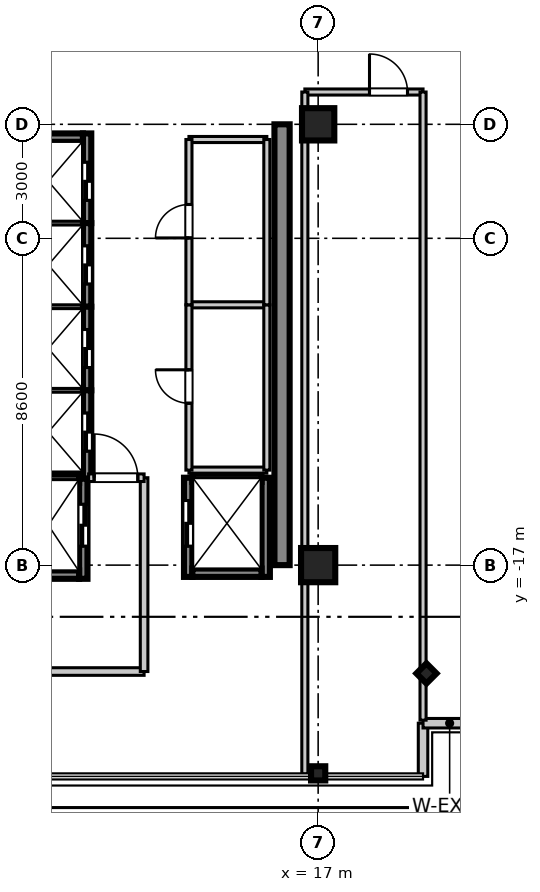
"""IFC4 building model, lengths in metres.
Left out: names, types, materials, properties, quantities, classifications, styles, units other than length and angle.
Written with IfcOpenShell. Run it as: python <this file> out.ifc"""

import sys

from ifc_helpers import new_model, si_unit, direction, frame, frame_2d, origin, origin_2d, place, context, subcontext, project, spatial, rectangle, i_section, extrude, source, transform, mapped, element, fill, save


model = new_model("IFC4")
c1 = context("Model", 3, precision=1e-05, world=origin(), true_north=direction((0.0, 1.0)))
c2 = subcontext(c1, "Body", "Model", "MODEL_VIEW")
j1 = project(units=[si_unit("LENGTHUNIT", "METRE"), si_unit("PLANEANGLEUNIT", "RADIAN")], contexts=[c1])
p1 = place(None, origin())
s1 = spatial("IfcSite", under=j1, at=p1, CompositionType="ELEMENT")
p2 = place(p1, origin())
s2 = spatial("IfcBuilding", under=s1, at=p2, CompositionType="ELEMENT")
p3 = place(p2, frame((0.0, 0.0, 266.3)))
s3 = spatial("IfcBuildingStorey", under=s2, at=p3, CompositionType="ELEMENT", Elevation=266.3)
m1 = source(origin(), c2, "Body", "SweptSolid", [
    extrude(rectangle(XDim=0.9, YDim=0.9, at=origin_2d()), origin(), (0.0, 0.0, 1.0), 3.705),
])
p4 = place(p3, frame((17.0, -17.0, 0.0), z_axis=(0.0, 0.0, 1.0), x_axis=(1.0, 0.0, 0.0)))
e1 = element("IfcColumn", 1, at=p4, inside=s3, PredefinedType="COLUMN", context=c2, shape_type="MappedRepresentation", body=[
    mapped(m1, transform((0.0, 0.0, 0.0), scale=1.0)),
])
m2 = source(origin(), c2, "Body", "SweptSolid", [
    extrude(rectangle(XDim=0.85, YDim=0.85, at=origin_2d()), origin(), (0.0, 0.0, 1.0), 3.705),
])
p5 = place(p3, frame((17.0, -5.4, 0.0), z_axis=(0.0, 0.0, 1.0), x_axis=(1.0, 0.0, 0.0)))
e2 = element("IfcColumn", 2, at=p5, inside=s3, PredefinedType="PILASTER", context=c2, shape_type="MappedRepresentation", body=[
    mapped(m2, transform((0.0, 0.0, 0.0), scale=1.0)),
])
m3 = source(origin(), c2, "Body", "SweptSolid", [
    extrude(i_section(OverallWidth=0.374, OverallDepth=0.374, WebThickness=0.014, FlangeThickness=0.023, at=origin_2d()), origin(), (0.0, 0.0, 1.0), 3.705),
])
for number, where, z_axis, x_axis in (
    (3, (17.0, -22.48, 0.0), (0.0, 0.0, 1.0), (0.0, 1.0, 0.0)),
    (4, (19.85, -19.85, 0.0), (0.0, 0.0, 1.0), (0.707, 0.707, 0.0)),
):
    element("IfcColumn", number, at=place(p3, frame(where, z_axis=z_axis, x_axis=x_axis)), inside=s3, PredefinedType="COLUMN", context=c2, shape_type="MappedRepresentation", body=[
        mapped(m3, transform((0.0, 0.0, 0.0), scale=1.0)),
    ])
m4 = source(origin(), c2, "Body", "SweptSolid", [
    extrude(rectangle(XDim=11.6, YDim=0.4, at=frame_2d((5.8, 0.0))), origin(), (0.0, 0.0, 1.0), 3.45),
])
p6 = place(p3, frame((16.05, -17.0, 0.0), z_axis=(0.0, 0.0, 1.0), x_axis=(0.0, 1.0, 0.0)))
e5 = element("IfcWall", 5, at=p6, inside=s3, PredefinedType="SHEAR", context=c2, shape_type="MappedRepresentation", body=[
    mapped(m4, transform((0.0, 0.0, 0.0), scale=1.0)),
])
m5 = source(origin(), c2, "Body", "SweptSolid", [
    extrude(rectangle(XDim=2.36, YDim=0.22, at=frame_2d((1.18, 0.0))), origin(), (0.0, 0.0, 1.0), 3.45),
])
p7 = place(p3, frame((10.92, -8.0, 0.0), z_axis=(0.0, 0.0, 1.0), x_axis=(0.0, 1.0, 0.0)))
e6 = element("IfcWall", 6, at=p7, inside=s3, PredefinedType="SHEAR", context=c2, shape_type="MappedRepresentation", body=[
    mapped(m5, transform((0.0, 0.0, 0.0), scale=1.0)),
])
p8 = place(p7, frame((0.6, 0.0, 0.0)))
e7 = element("IfcOpeningElement", 7, at=p8, cuts=e6, PredefinedType="OPENING", context=c2, shape_type="SweptSolid", body=[
    extrude(rectangle(XDim=1.0, YDim=2.2, at=frame_2d((0.5, 1.1))), frame((0.0, 0.12, 0.0), z_axis=(0.0, -1.0, 0.0), x_axis=(1.0, 0.0, 0.0)), (0.0, 0.0, 1.0), 0.24),
])
m6 = source(origin(), c2, "Body", "SweptSolid", [
    extrude(rectangle(XDim=1.82, YDim=0.22, at=frame_2d((0.91, 0.0))), origin(), (0.0, 0.0, 1.0), 3.45),
])
p9 = place(p3, frame((8.99, -5.75, 0.0), z_axis=(0.0, 0.0, 1.0), x_axis=(1.0, 0.0, 0.0)))
e8 = element("IfcWall", 8, at=p9, inside=s3, PredefinedType="SHEAR", context=c2, shape_type="MappedRepresentation", body=[
    mapped(m6, transform((0.0, 0.0, 0.0), scale=1.0)),
])
m7 = source(origin(), c2, "Body", "SweptSolid", [
    extrude(rectangle(XDim=2.2, YDim=0.22, at=frame_2d((1.1, 0.0))), origin(), (0.0, 0.0, 1.0), 3.45),
])
p10 = place(p3, frame((10.92, -10.2, 0.0), z_axis=(0.0, 0.0, 1.0), x_axis=(0.0, 1.0, 0.0)))
e9 = element("IfcWall", 9, at=p10, inside=s3, PredefinedType="SHEAR", context=c2, shape_type="MappedRepresentation", body=[
    mapped(m7, transform((0.0, 0.0, 0.0), scale=1.0)),
])
p11 = place(p10, frame((0.6, 0.0, 0.0)))
e10 = element("IfcOpeningElement", 10, at=p11, cuts=e9, PredefinedType="OPENING", context=c2, shape_type="SweptSolid", body=[
    extrude(rectangle(XDim=1.0, YDim=2.2, at=frame_2d((0.5, 1.1))), frame((0.0, 0.12, 0.0), z_axis=(0.0, -1.0, 0.0), x_axis=(1.0, 0.0, 0.0)), (0.0, 0.0, 1.0), 0.24),
])
m8 = source(origin(), c2, "Body", "SweptSolid", [
    extrude(rectangle(XDim=1.82, YDim=0.22, at=frame_2d((0.91, 0.0))), origin(), (0.0, 0.0, 1.0), 3.75),
])
p12 = place(p3, frame((8.99, -8.0, 0.0), z_axis=(0.0, 0.0, 1.0), x_axis=(1.0, 0.0, 0.0)))
e11 = element("IfcWall", 11, at=p12, inside=s3, PredefinedType="SHEAR", context=c2, shape_type="MappedRepresentation", body=[
    mapped(m8, transform((0.0, 0.0, 0.0), scale=1.0)),
])
p13 = place(p3, frame((10.92, -12.4, 0.0), z_axis=(0.0, 0.0, 1.0), x_axis=(0.0, 1.0, 0.0)))
e12 = element("IfcWall", 12, at=p13, inside=s3, PredefinedType="SHEAR", context=c2, shape_type="MappedRepresentation", body=[
    mapped(m7, transform((0.0, 0.0, 0.0), scale=1.0)),
])
p14 = place(p13, frame((0.6, 0.0, 0.0)))
e13 = element("IfcOpeningElement", 13, at=p14, cuts=e12, PredefinedType="OPENING", context=c2, shape_type="SweptSolid", body=[
    extrude(rectangle(XDim=1.0, YDim=2.2, at=frame_2d((0.5, 1.1))), frame((0.0, 0.12, 0.0), z_axis=(0.0, -1.0, 0.0), x_axis=(1.0, 0.0, 0.0)), (0.0, 0.0, 1.0), 0.24),
])
p15 = place(p3, frame((8.99, -10.2, 0.0), z_axis=(0.0, 0.0, 1.0), x_axis=(1.0, 0.0, 0.0)))
e14 = element("IfcWall", 14, at=p15, inside=s3, PredefinedType="SHEAR", context=c2, shape_type="MappedRepresentation", body=[
    mapped(m8, transform((0.0, 0.0, 0.0), scale=1.0)),
])
m9 = source(origin(), c2, "Body", "SweptSolid", [
    extrude(rectangle(XDim=2.325, YDim=0.22, at=frame_2d((1.163, 0.0))), origin(), (0.0, 0.0, 1.0), 3.45),
])
p16 = place(p3, frame((10.92, -14.725, 0.0), z_axis=(0.0, 0.0, 1.0), x_axis=(0.0, 1.0, 0.0)))
e15 = element("IfcWall", 15, at=p16, inside=s3, PredefinedType="SHEAR", context=c2, shape_type="MappedRepresentation", body=[
    mapped(m9, transform((0.0, 0.0, 0.0), scale=1.0)),
])
p17 = place(p16, frame((0.725, 0.0, 0.0)))
e16 = element("IfcOpeningElement", 16, at=p17, cuts=e15, PredefinedType="OPENING", context=c2, shape_type="SweptSolid", body=[
    extrude(rectangle(XDim=1.0, YDim=2.2, at=frame_2d((0.5, 1.1))), frame((0.0, 0.12, 0.0), z_axis=(0.0, -1.0, 0.0), x_axis=(1.0, 0.0, 0.0)), (0.0, 0.0, 1.0), 0.24),
])
p18 = place(p3, frame((8.99, -12.4, 0.0), z_axis=(0.0, 0.0, 1.0), x_axis=(1.0, 0.0, 0.0)))
e17 = element("IfcWall", 17, at=p18, inside=s3, PredefinedType="SHEAR", context=c2, shape_type="MappedRepresentation", body=[
    mapped(m8, transform((0.0, 0.0, 0.0), scale=1.0)),
])
m10 = source(origin(), c2, "Body", "SweptSolid", [
    extrude(rectangle(XDim=2.635, YDim=0.22, at=frame_2d((1.317, 0.0))), origin(), (0.0, 0.0, 1.0), 3.45),
])
p19 = place(p3, frame((10.82, -17.36, 0.0), z_axis=(0.0, 0.0, 1.0), x_axis=(0.0, 1.0, 0.0)))
e18 = element("IfcWall", 18, at=p19, inside=s3, PredefinedType="SHEAR", context=c2, shape_type="MappedRepresentation", body=[
    mapped(m10, transform((0.0, 0.0, 0.0), scale=1.0)),
])
p20 = place(p19, frame((0.86, 0.0, 0.0)))
e19 = element("IfcOpeningElement", 19, at=p20, cuts=e18, PredefinedType="OPENING", context=c2, shape_type="SweptSolid", body=[
    extrude(rectangle(XDim=1.1, YDim=2.2, at=frame_2d((0.55, 1.1))), frame((0.0, 0.12, 0.0), z_axis=(0.0, -1.0, 0.0), x_axis=(1.0, 0.0, 0.0)), (0.0, 0.0, 1.0), 0.24),
])
m11 = source(origin(), c2, "Body", "SweptSolid", [
    extrude(rectangle(XDim=1.62, YDim=0.22, at=frame_2d((0.81, 0.0))), origin(), (0.0, 0.0, 1.0), 3.45),
])
p21 = place(p3, frame((9.09, -17.25, 0.0), z_axis=(0.0, 0.0, 1.0), x_axis=(1.0, 0.0, 0.0)))
e20 = element("IfcWall", 20, at=p21, inside=s3, PredefinedType="SHEAR", context=c2, shape_type="MappedRepresentation", body=[
    mapped(m11, transform((0.0, 0.0, 0.0), scale=1.0)),
])
m12 = source(origin(), c2, "Body", "SweptSolid", [
    extrude(rectangle(XDim=1.62, YDim=0.22, at=frame_2d((0.81, 0.0))), origin(), (0.0, 0.0, 1.0), 3.75),
])
p22 = place(p3, frame((9.09, -14.725, 0.0), z_axis=(0.0, 0.0, 1.0), x_axis=(1.0, 0.0, 0.0)))
e21 = element("IfcWall", 21, at=p22, inside=s3, PredefinedType="SHEAR", context=c2, shape_type="MappedRepresentation", body=[
    mapped(m12, transform((0.0, 0.0, 0.0), scale=1.0)),
])
m13 = source(origin(), c2, "Body", "SweptSolid", [
    extrude(rectangle(XDim=2.61, YDim=0.22, at=frame_2d((1.305, 0.0))), origin(), (0.0, 0.0, 1.0), 3.45),
])
p23 = place(p3, frame((13.58, -17.31, 0.0), z_axis=(0.0, 0.0, 1.0), x_axis=(0.0, 1.0, 0.0)))
e22 = element("IfcWall", 22, at=p23, inside=s3, PredefinedType="SHEAR", context=c2, shape_type="MappedRepresentation", body=[
    mapped(m13, transform((0.0, 0.0, 0.0), scale=1.0)),
])
p24 = place(p23, frame((0.81, 0.0, 0.0)))
e23 = element("IfcOpeningElement", 23, at=p24, cuts=e22, PredefinedType="OPENING", context=c2, shape_type="SweptSolid", body=[
    extrude(rectangle(XDim=1.2, YDim=2.2, at=frame_2d((0.6, 1.1))), frame((0.0, 0.12, 0.0), z_axis=(0.0, -1.0, 0.0), x_axis=(1.0, 0.0, 0.0)), (0.0, 0.0, 1.0), 0.24),
])
p25 = place(p3, frame((15.62, -17.31, 0.0), z_axis=(0.0, 0.0, 1.0), x_axis=(0.0, 1.0, 0.0)))
e24 = element("IfcWall", 24, at=p25, inside=s3, PredefinedType="SHEAR", context=c2, shape_type="MappedRepresentation", body=[
    mapped(m13, transform((0.0, 0.0, 0.0), scale=1.0)),
])
p26 = place(p3, frame((13.69, -17.2, 0.0), z_axis=(0.0, 0.0, 1.0), x_axis=(1.0, 0.0, 0.0)))
e25 = element("IfcWall", 25, at=p26, inside=s3, PredefinedType="SHEAR", context=c2, shape_type="MappedRepresentation", body=[
    mapped(m6, transform((0.0, 0.0, 0.0), scale=1.0)),
])
p27 = place(p3, frame((13.69, -14.7, 0.0), z_axis=(0.0, 0.0, 1.0), x_axis=(1.0, 0.0, 0.0)))
e26 = element("IfcWall", 26, at=p27, inside=s3, PredefinedType="SHEAR", context=c2, shape_type="MappedRepresentation", body=[
    mapped(m8, transform((0.0, 0.0, 0.0), scale=1.0)),
])
m14 = source(origin(), c2, "Body", "SweptSolid", [
    extrude(rectangle(XDim=1.4, YDim=0.25, at=frame_2d((0.7, 0.0))), origin(), (0.0, 0.0, 1.0), 3.45),
])
p28 = place(p3, frame((19.76, -22.56, 0.0), z_axis=(0.0, 0.0, 1.0), x_axis=(0.0, 1.0, 0.0)))
e27 = element("IfcWall", 27, at=p28, inside=s3, PredefinedType="STANDARD", context=c2, shape_type="MappedRepresentation", body=[
    mapped(m14, transform((0.0, 0.0, 0.0), scale=1.0)),
])
m15 = source(origin(), c2, "Body", "SweptSolid", [
    extrude(rectangle(XDim=1.4, YDim=0.25, at=frame_2d((0.7, 0.0))), origin(), (0.0, 0.0, 1.0), 3.45),
])
p29 = place(p3, frame((19.76, -21.16, 0.0), z_axis=(0.0, 0.0, 1.0), x_axis=(1.0, 0.0, 0.0)))
e28 = element("IfcWall", 28, at=p29, inside=s3, PredefinedType="STANDARD", context=c2, shape_type="MappedRepresentation", body=[
    mapped(m15, transform((0.0, 0.0, 0.0), scale=1.0)),
])
m16 = source(origin(), c2, "Body", "SweptSolid", [
    extrude(rectangle(XDim=5.82, YDim=0.2, at=frame_2d((2.91, 0.0))), origin(), (0.0, 0.0, 1.0), 2.79),
])
p30 = place(p3, frame((6.6, -19.8, 0.0), z_axis=(0.0, 0.0, 1.0), x_axis=(1.0, 0.0, 0.0)))
e29 = element("IfcWall", 29, at=p30, inside=s3, PredefinedType="PARTITIONING", context=c2, shape_type="MappedRepresentation", body=[
    mapped(m16, transform((0.0, 0.0, 0.0), scale=1.0)),
])
m17 = source(origin(), c2, "Body", "SweptSolid", [
    extrude(rectangle(XDim=5.1, YDim=0.2, at=frame_2d((2.55, 0.0))), origin(), (0.0, 0.0, 1.0), 2.79),
])
p31 = place(p3, frame((12.42, -19.8, 0.0), z_axis=(0.0, 0.0, 1.0), x_axis=(0.0, 1.0, 0.0)))
e30 = element("IfcWall", 30, at=p31, inside=s3, PredefinedType="PARTITIONING", context=c2, shape_type="MappedRepresentation", body=[
    mapped(m17, transform((0.0, 0.0, 0.0), scale=1.0)),
])
m18 = source(origin(), c2, "Body", "SweptSolid", [
    extrude(rectangle(XDim=1.46, YDim=0.2, at=frame_2d((0.73, 0.0))), origin(), (0.0, 0.0, 1.0), 2.79),
])
p32 = place(p3, frame((10.96, -14.7, 0.0), z_axis=(0.0, 0.0, 1.0), x_axis=(1.0, 0.0, 0.0)))
e31 = element("IfcWall", 31, at=p32, inside=s3, PredefinedType="PARTITIONING", context=c2, shape_type="MappedRepresentation", body=[
    mapped(m18, transform((0.0, 0.0, 0.0), scale=1.0)),
])
p33 = place(p32, frame((0.145, 0.0, 0.0)))
e32 = element("IfcOpeningElement", 32, at=p33, cuts=e31, PredefinedType="OPENING", context=c2, shape_type="SweptSolid", body=[
    extrude(rectangle(XDim=1.15, YDim=2.15, at=frame_2d((0.575, 1.075))), frame((0.0, 0.11, 0.0), z_axis=(0.0, -1.0, 0.0), x_axis=(1.0, 0.0, 0.0)), (0.0, 0.0, 1.0), 0.22),
])
m19 = source(origin(), c2, "Body", "SweptSolid", [
    extrude(rectangle(XDim=2.05, YDim=0.16, at=frame_2d((1.025, 0.0))), origin(), (0.0, 0.0, 1.0), 2.79),
])
for number, where, z_axis, x_axis in (
    (33, (13.6, -14.5, 0.0), (0.0, 0.0, 1.0), (1.0, 0.0, 0.0)),
    (34, (13.6, -10.15, 0.0), (0.0, 0.0, 1.0), (1.0, 0.0, 0.0)),
):
    element("IfcWall", number, at=place(p3, frame(where, z_axis=z_axis, x_axis=x_axis)), inside=s3, PredefinedType="PARTITIONING", context=c2, shape_type="MappedRepresentation", body=[
        mapped(m19, transform((0.0, 0.0, 0.0), scale=1.0)),
    ])
m20 = source(origin(), c2, "Body", "SweptSolid", [
    extrude(rectangle(XDim=4.35, YDim=0.16, at=frame_2d((2.175, 0.0))), origin(), (0.0, 0.0, 1.0), 2.79),
])
p34 = place(p3, frame((13.6, -14.5, 0.0), z_axis=(0.0, 0.0, 1.0), x_axis=(0.0, 1.0, 0.0)))
e35 = element("IfcWall", 35, at=p34, inside=s3, PredefinedType="PARTITIONING", context=c2, shape_type="MappedRepresentation", body=[
    mapped(m20, transform((0.0, 0.0, 0.0), scale=1.0)),
])
p35 = place(p34, frame((1.76, 0.0, 0.0)))
e36 = element("IfcOpeningElement", 36, at=p35, cuts=e35, PredefinedType="OPENING", context=c2, shape_type="SweptSolid", body=[
    extrude(rectangle(XDim=0.88, YDim=2.1, at=frame_2d((0.44, 1.05))), frame((0.0, 0.09, 0.0), z_axis=(0.0, -1.0, 0.0), x_axis=(1.0, 0.0, 0.0)), (0.0, 0.0, 1.0), 0.18),
])
p36 = place(p3, frame((15.65, -14.5, 0.0), z_axis=(0.0, 0.0, 1.0), x_axis=(0.0, 1.0, 0.0)))
e37 = element("IfcWall", 37, at=p36, inside=s3, PredefinedType="PARTITIONING", context=c2, shape_type="MappedRepresentation", body=[
    mapped(m20, transform((0.0, 0.0, 0.0), scale=1.0)),
])
p37 = place(p3, frame((13.6, -5.8, 0.0), z_axis=(0.0, 0.0, 1.0), x_axis=(1.0, 0.0, 0.0)))
e38 = element("IfcWall", 38, at=p37, inside=s3, PredefinedType="PARTITIONING", context=c2, shape_type="MappedRepresentation", body=[
    mapped(m19, transform((0.0, 0.0, 0.0), scale=1.0)),
])
m21 = source(origin(), c2, "Body", "SweptSolid", [
    extrude(rectangle(XDim=4.35, YDim=0.16, at=frame_2d((2.175, 0.0))), origin(), (0.0, 0.0, 1.0), 2.79),
])
p38 = place(p3, frame((13.6, -10.15, 0.0), z_axis=(0.0, 0.0, 1.0), x_axis=(0.0, 1.0, 0.0)))
e39 = element("IfcWall", 39, at=p38, inside=s3, PredefinedType="PARTITIONING", context=c2, shape_type="MappedRepresentation", body=[
    mapped(m21, transform((0.0, 0.0, 0.0), scale=1.0)),
])
p39 = place(p38, frame((1.76, 0.0, 0.0)))
e40 = element("IfcOpeningElement", 40, at=p39, cuts=e39, PredefinedType="OPENING", context=c2, shape_type="SweptSolid", body=[
    extrude(rectangle(XDim=0.88, YDim=2.1, at=frame_2d((0.44, 1.05))), frame((0.0, 0.09, 0.0), z_axis=(0.0, -1.0, 0.0), x_axis=(1.0, 0.0, 0.0)), (0.0, 0.0, 1.0), 0.18),
])
p40 = place(p3, frame((15.65, -10.15, 0.0), z_axis=(0.0, 0.0, 1.0), x_axis=(0.0, 1.0, 0.0)))
e41 = element("IfcWall", 41, at=p40, inside=s3, PredefinedType="PARTITIONING", context=c2, shape_type="MappedRepresentation", body=[
    mapped(m21, transform((0.0, 0.0, 0.0), scale=1.0)),
])
m22 = source(origin(), c2, "Body", "SweptSolid", [
    extrude(rectangle(XDim=3.11, YDim=0.16, at=frame_2d((1.555, 0.0))), origin(), (0.0, 0.0, 1.0), 2.79),
])
p41 = place(p3, frame((16.65, -4.55, 0.0), z_axis=(0.0, 0.0, 1.0), x_axis=(1.0, 0.0, 0.0)))
e42 = element("IfcWall", 42, at=p41, inside=s3, PredefinedType="PARTITIONING", context=c2, shape_type="MappedRepresentation", body=[
    mapped(m22, transform((0.0, 0.0, 0.0), scale=1.0)),
])
p42 = place(p41, frame((1.701, 0.0, 0.0)))
e43 = element("IfcOpeningElement", 43, at=p42, cuts=e42, PredefinedType="OPENING", context=c2, shape_type="SweptSolid", body=[
    extrude(rectangle(XDim=1.0, YDim=2.1, at=frame_2d((0.5, 1.05))), frame((0.0, 0.09, 0.0), z_axis=(0.0, -1.0, 0.0), x_axis=(1.0, 0.0, 0.0)), (0.0, 0.0, 1.0), 0.18),
])
m23 = source(origin(), c2, "Body", "SweptSolid", [
    extrude(rectangle(XDim=17.95, YDim=0.16, at=frame_2d((8.975, 0.0))), origin(), (0.0, 0.0, 1.0), 2.79),
])
p43 = place(p3, frame((16.65, -22.5, 0.0), z_axis=(0.0, 0.0, 1.0), x_axis=(0.0, 1.0, 0.0)))
e44 = element("IfcWall", 44, at=p43, inside=s3, PredefinedType="PARTITIONING", context=c2, shape_type="MappedRepresentation", body=[
    mapped(m23, transform((0.0, 0.0, 0.0), scale=1.0)),
])
m24 = source(origin(), c2, "Body", "SweptSolid", [
    extrude(rectangle(XDim=16.53, YDim=0.16, at=frame_2d((8.265, 0.0))), origin(), (0.0, 0.0, 1.0), 2.79),
])
p44 = place(p3, frame((19.76, -21.08, 0.0), z_axis=(0.0, 0.0, 1.0), x_axis=(0.0, 1.0, 0.0)))
e45 = element("IfcWall", 45, at=p44, inside=s3, PredefinedType="PARTITIONING", context=c2, shape_type="MappedRepresentation", body=[
    mapped(m24, transform((0.0, 0.0, 0.0), scale=1.0)),
])
m25 = source(origin(), c2, "Body", "SweptSolid", [
    extrude(rectangle(XDim=1.0, YDim=2.2, at=frame_2d((0.5, 1.1))), frame((0.0, 0.025, 0.0), z_axis=(0.0, -1.0, 0.0), x_axis=(1.0, 0.0, 0.0)), (0.0, 0.0, 1.0), 0.05),
])
p45 = place(p8, frame((1.0, 0.0, 0.0), z_axis=(0.0, 0.0, 1.0), x_axis=(-1.0, 0.0, 0.0)))
e46 = element("IfcDoor", 46, at=p45, inside=s3, OperationType="DOUBLE_DOOR_SLIDING", PredefinedType="DOOR", context=c2, shape_type="MappedRepresentation", body=[
    mapped(m25, transform((0.0, 0.0, 0.0), scale=1.0)),
])
fill(e7, e46)
p46 = place(p11, frame((1.0, 0.0, 0.0), z_axis=(0.0, 0.0, 1.0), x_axis=(-1.0, 0.0, 0.0)))
e47 = element("IfcDoor", 47, at=p46, inside=s3, OperationType="DOUBLE_DOOR_SLIDING", PredefinedType="DOOR", context=c2, shape_type="MappedRepresentation", body=[
    mapped(m25, transform((0.0, 0.0, 0.0), scale=1.0)),
])
fill(e10, e47)
p47 = place(p14, frame((1.0, 0.0, 0.0), z_axis=(0.0, 0.0, 1.0), x_axis=(-1.0, 0.0, 0.0)))
e48 = element("IfcDoor", 48, at=p47, inside=s3, OperationType="DOUBLE_DOOR_SLIDING", PredefinedType="DOOR", context=c2, shape_type="MappedRepresentation", body=[
    mapped(m25, transform((0.0, 0.0, 0.0), scale=1.0)),
])
fill(e13, e48)
p48 = place(p17, frame((1.0, 0.0, 0.0), z_axis=(0.0, 0.0, 1.0), x_axis=(-1.0, 0.0, 0.0)))
e49 = element("IfcDoor", 49, at=p48, inside=s3, OperationType="DOUBLE_DOOR_SLIDING", PredefinedType="DOOR", context=c2, shape_type="MappedRepresentation", body=[
    mapped(m25, transform((0.0, 0.0, 0.0), scale=1.0)),
])
fill(e16, e49)
m26 = source(origin(), c2, "Body", "SweptSolid", [
    extrude(rectangle(XDim=1.1, YDim=2.2, at=frame_2d((0.55, 1.1))), frame((0.0, 0.025, 0.0), z_axis=(0.0, -1.0, 0.0), x_axis=(1.0, 0.0, 0.0)), (0.0, 0.0, 1.0), 0.05),
])
p49 = place(p20, frame((1.1, 0.0, 0.0), z_axis=(0.0, 0.0, 1.0), x_axis=(-1.0, 0.0, 0.0)))
e50 = element("IfcDoor", 50, at=p49, inside=s3, OperationType="DOUBLE_DOOR_SLIDING", PredefinedType="DOOR", context=c2, shape_type="MappedRepresentation", body=[
    mapped(m26, transform((0.0, 0.0, 0.0), scale=1.0)),
])
fill(e19, e50)
m27 = source(origin(), c2, "Body", "SweptSolid", [
    extrude(rectangle(XDim=1.2, YDim=2.2, at=frame_2d((0.6, 1.1))), frame((0.0, 0.025, 0.0), z_axis=(0.0, -1.0, 0.0), x_axis=(1.0, 0.0, 0.0)), (0.0, 0.0, 1.0), 0.05),
])
p50 = place(p24, origin())
e51 = element("IfcDoor", 51, at=p50, inside=s3, OperationType="DOUBLE_DOOR_SLIDING", PredefinedType="DOOR", context=c2, shape_type="MappedRepresentation", body=[
    mapped(m27, transform((0.0, 0.0, 0.0), scale=1.0)),
])
fill(e23, e51)
m28 = source(origin(), c2, "Body", "SweptSolid", [
    extrude(rectangle(XDim=1.15, YDim=2.15, at=frame_2d((0.575, 1.075))), frame((0.0, 0.025, 0.0), z_axis=(0.0, -1.0, 0.0), x_axis=(1.0, 0.0, 0.0)), (0.0, 0.0, 1.0), 0.05),
])
p51 = place(p33, origin())
e52 = element("IfcDoor", 52, at=p51, inside=s3, OperationType="SINGLE_SWING_LEFT", PredefinedType="DOOR", context=c2, shape_type="MappedRepresentation", body=[
    mapped(m28, transform((0.0, 0.0, 0.0), scale=1.0)),
])
fill(e32, e52)
m29 = source(origin(), c2, "Body", "SweptSolid", [
    extrude(rectangle(XDim=0.88, YDim=2.1, at=frame_2d((0.44, 1.05))), frame((0.0, 0.025, 0.0), z_axis=(0.0, -1.0, 0.0), x_axis=(1.0, 0.0, 0.0)), (0.0, 0.0, 1.0), 0.05),
])
p52 = place(p35, frame((0.88, 0.0, 0.0), z_axis=(0.0, 0.0, 1.0), x_axis=(-1.0, 0.0, 0.0)))
e53 = element("IfcDoor", 53, at=p52, inside=s3, OperationType="SINGLE_SWING_RIGHT", PredefinedType="DOOR", context=c2, shape_type="MappedRepresentation", body=[
    mapped(m29, transform((0.0, 0.0, 0.0), scale=1.0)),
])
fill(e36, e53)
p53 = place(p39, frame((0.88, 0.0, 0.0), z_axis=(0.0, 0.0, 1.0), x_axis=(-1.0, 0.0, 0.0)))
e54 = element("IfcDoor", 54, at=p53, inside=s3, OperationType="SINGLE_SWING_LEFT", PredefinedType="DOOR", context=c2, shape_type="MappedRepresentation", body=[
    mapped(m29, transform((0.0, 0.0, 0.0), scale=1.0)),
])
fill(e40, e54)
m30 = source(origin(), c2, "Body", "SweptSolid", [
    extrude(rectangle(XDim=1.0, YDim=2.1, at=frame_2d((0.5, 1.05))), frame((0.0, 0.025, 0.0), z_axis=(0.0, -1.0, 0.0), x_axis=(1.0, 0.0, 0.0)), (0.0, 0.0, 1.0), 0.05),
])
p54 = place(p42, frame((1.0, 0.0, 0.0), z_axis=(0.0, 0.0, 1.0), x_axis=(-1.0, 0.0, 0.0)))
e55 = element("IfcDoor", 55, at=p54, inside=s3, OperationType="SINGLE_SWING_LEFT", PredefinedType="DOOR", context=c2, shape_type="MappedRepresentation", body=[
    mapped(m30, transform((0.0, 0.0, 0.0), scale=1.0)),
])
fill(e43, e55)
save(model, sys.argv[1])
